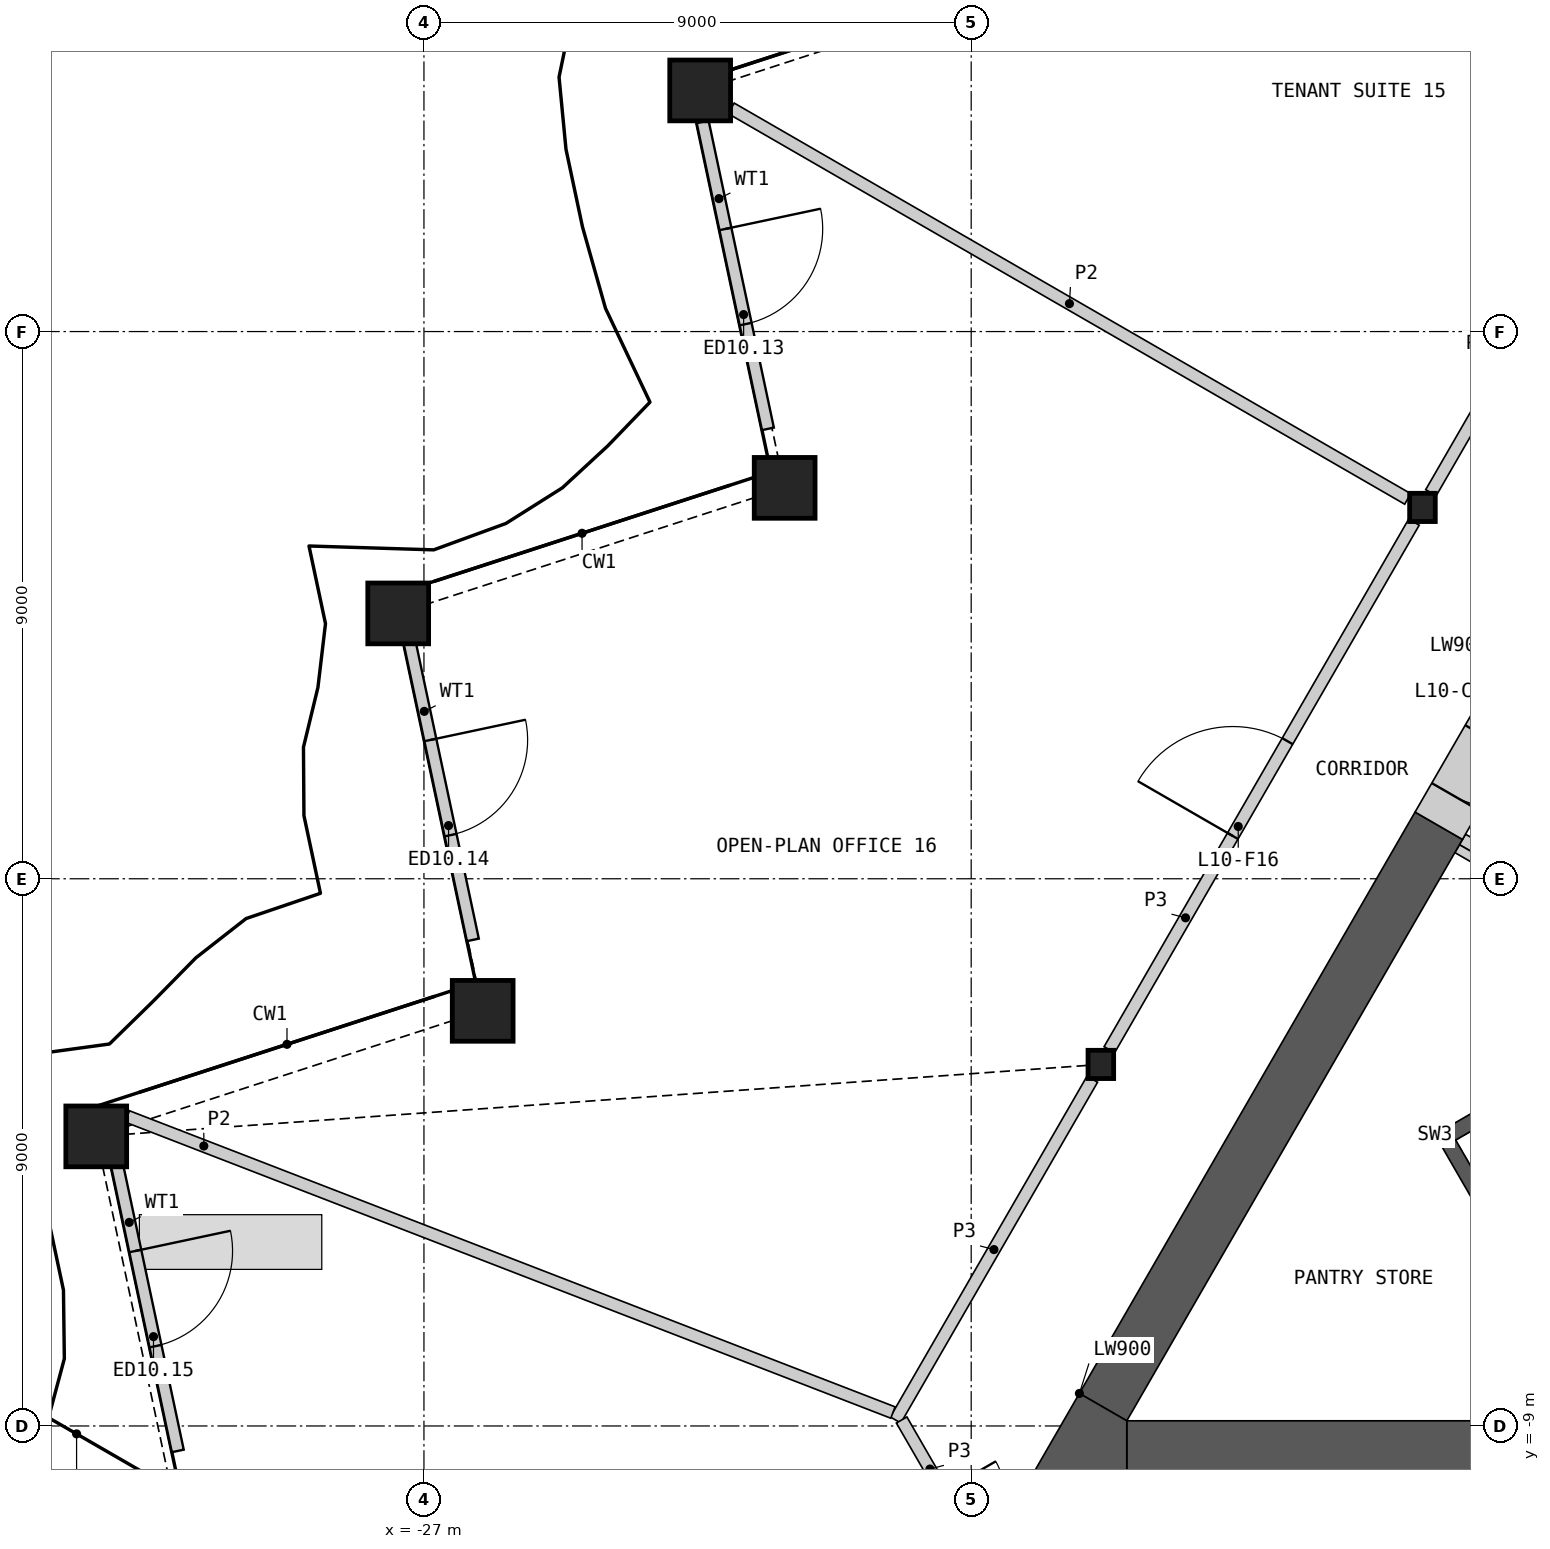
"""IFC4 building model, lengths in metres.
Left out: names, types, materials, properties, quantities, classifications, styles, units other than length and angle.
Written with IfcOpenShell. Run it as: python <this file> out.ifc"""

import sys

from ifc_helpers import new_model, si_unit, direction, frame, frame_2d, origin, origin_2d, place, context, subcontext, project, spatial, polyline, rectangle, hollow_rectangle, i_section, outline, extrude, element, fill, save


model = new_model("IFC4")
c1 = context("Model", 3, precision=1e-05, world=origin(), true_north=direction((0.0, 1.0)))
c2 = subcontext(c1, "Body", "Model", "MODEL_VIEW")
j1 = project(units=[si_unit("LENGTHUNIT", "METRE"), si_unit("PLANEANGLEUNIT", "RADIAN")], contexts=[c1])
p1 = place(None, origin())
s1 = spatial("IfcSite", under=j1, at=p1, CompositionType="ELEMENT")
p2 = place(p1, origin())
s2 = spatial("IfcBuilding", under=s1, at=p2, CompositionType="ELEMENT")
p3 = place(p2, frame((0.0, 0.0, 51.0)))
s3 = spatial("IfcBuildingStorey", under=s2, at=p3, CompositionType="ELEMENT", Elevation=51.0)
for number, where, z_axis, x_axis in (
    (1, (-22.457, 12.966, 0.0), (0.0, 0.0, 1.0), (1.0, 0.0, 0.0)),
    (2, (-21.068, 6.429, 0.0), (0.0, 0.0, 1.0), (1.0, 0.0, 0.0)),
    (3, (-27.423, 4.364, 0.0), (0.0, 0.0, 1.0), (1.0, 0.0, 0.0)),
    (4, (-26.034, -2.172, 0.0), (0.0, 0.0, 1.0), (1.0, 0.0, 0.0)),
    (5, (-32.389, -4.237, 0.0), (0.0, 0.0, 1.0), (1.0, 0.0, 0.0)),
):
    element("IfcColumn", number, at=place(p3, frame(where, z_axis=z_axis, x_axis=x_axis)), inside=s3, PredefinedType="COLUMN", context=c2, shape_type="SweptSolid", body=[
        extrude(hollow_rectangle(XDim=1.0, YDim=1.0, WallThickness=0.07, at=origin_2d()), origin(), (0.0, 0.0, 1.0), 4.2),
    ])
for number, where, z_axis, x_axis in (
    (6, (-10.578, 6.107, 0.0), (0.0, 0.0, 1.0), (1.0, 0.0, 0.0)),
    (7, (-15.868, -3.054, 0.0), (0.0, 0.0, 1.0), (1.0, 0.0, 0.0)),
):
    element("IfcColumn", number, at=place(p3, frame(where, z_axis=z_axis, x_axis=x_axis)), inside=s3, PredefinedType="COLUMN", context=c2, shape_type="SweptSolid", body=[
        extrude(i_section(OverallWidth=0.421, OverallDepth=0.465, WebThickness=0.045, FlangeThickness=0.072, at=origin_2d()), origin(), (0.0, 0.0, 1.0), 4.2),
    ])
p4 = place(p3, frame((-22.416, 12.449, 0.0), z_axis=(0.0, 0.0, 1.0), x_axis=(0.207907400709, -0.978148512615, 0.0)))
e8 = element("IfcWall", 8, at=p4, inside=s3, PredefinedType="SOLIDWALL", context=c2, shape_type="SweptSolid", body=[
    extrude(rectangle(XDim=5.162, YDim=0.2, at=frame_2d((2.581, 0.0))), origin(), (0.0, 0.0, 1.0), 3.189),
])
p5 = place(p4, frame((1.8, 0.0, 0.0)))
e9 = element("IfcOpeningElement", 9, at=p5, cuts=e8, PredefinedType="OPENING", context=c2, shape_type="SweptSolid", body=[
    extrude(rectangle(XDim=1.6, YDim=2.4, at=frame_2d((0.8, 1.2))), frame((0.0, 0.11, 0.0), z_axis=(0.0, -1.0, 0.0), x_axis=(1.0, 0.0, 0.0)), (0.0, 0.0, 1.0), 0.22),
])
p6 = place(p3, frame((-27.261, 4.006, 0.0), z_axis=(0.0, 0.0, 1.0), x_axis=(0.207885539143, -0.978153159079, 0.0)))
e10 = element("IfcWall", 10, at=p6, inside=s3, PredefinedType="SOLIDWALL", context=c2, shape_type="SweptSolid", body=[
    extrude(rectangle(XDim=5.124, YDim=0.2, at=frame_2d((2.562, 0.0))), origin(), (0.0, 0.0, 1.0), 3.189),
])
p7 = place(p6, frame((1.762, 0.0, 0.0)))
e11 = element("IfcOpeningElement", 11, at=p7, cuts=e10, PredefinedType="OPENING", context=c2, shape_type="SweptSolid", body=[
    extrude(rectangle(XDim=1.6, YDim=2.4, at=frame_2d((0.8, 1.2))), frame((0.0, 0.11, 0.0), z_axis=(0.0, -1.0, 0.0), x_axis=(1.0, 0.0, 0.0)), (0.0, 0.0, 1.0), 0.22),
])
p8 = place(p3, frame((-32.114, -4.399, 0.0), z_axis=(0.0, 0.0, 1.0), x_axis=(0.207931126702, -0.978143469307, 0.0)))
e12 = element("IfcWall", 12, at=p8, inside=s3, PredefinedType="SOLIDWALL", context=c2, shape_type="SweptSolid", body=[
    extrude(rectangle(XDim=5.124, YDim=0.2, at=frame_2d((2.562, 0.0))), origin(), (0.0, 0.0, 1.0), 3.189),
])
p9 = place(p8, frame((1.762, 0.0, 0.0)))
e13 = element("IfcOpeningElement", 13, at=p9, cuts=e12, PredefinedType="OPENING", context=c2, shape_type="SweptSolid", body=[
    extrude(rectangle(XDim=1.6, YDim=2.4, at=frame_2d((0.8, 1.2))), frame((0.0, 0.11, 0.0), z_axis=(0.0, -1.0, 0.0), x_axis=(1.0, 0.0, 0.0)), (0.0, 0.0, 1.0), 0.22),
])
p10 = place(p3, frame((-8.181, -0.357, 0.0), z_axis=(0.0, 0.0, 1.0), x_axis=(-0.866035824272, 0.499981950752, 0.0)))
e14 = element("IfcWall", 14, at=p10, inside=s3, PredefinedType="SHEAR", context=c2, shape_type="SweptSolid", body=[
    extrude(rectangle(XDim=2.009, YDim=0.2, at=frame_2d((1.004, 0.0))), origin(), (0.0, 0.0, 1.0), 3.8),
])
p11 = place(p3, origin())
e15 = element("IfcWall", 15, at=p11, inside=s3, PredefinedType="SHEAR", context=c2, shape_type="SweptSolid", body=[
    extrude(outline(polyline([(-5.307, -1.281), (-10.374, -4.206), (-10.032, -4.298), (-5.182, -1.498), (-5.307, -1.281)])), origin(), (0.0, 0.0, 1.0), 3.8),
])
p12 = place(p3, origin())
e16 = element("IfcWall", 16, at=p12, inside=s3, PredefinedType="SHEAR", context=c2, shape_type="SweptSolid", body=[
    extrude(outline(polyline([(-10.374, -4.206), (-8.83, -6.881), (-8.738, -6.539), (-10.032, -4.298), (-10.374, -4.206)])), origin(), (0.0, 0.0, 1.0), 3.8),
])
p13 = place(p3, frame((-8.268, -0.509, 0.0), z_axis=(0.0, 0.0, 1.0), x_axis=(-0.866035824272, 0.499981950752, 0.0)))
e17 = element("IfcWall", 17, at=p13, inside=s3, PredefinedType="PARTITIONING", context=c2, shape_type="SweptSolid", body=[
    extrude(rectangle(XDim=2.009, YDim=0.15, at=frame_2d((1.004, 0.0))), origin(), (0.0, 0.0, 1.0), 3.8),
])
p14 = place(p3, frame((-15.441, -9.365, 0.0), z_axis=(0.0, 0.0, 1.0), x_axis=(1.0, 0.0, 0.0)))
e18 = element("IfcWall", 18, at=p14, inside=s3, PredefinedType="SHEAR", context=c2, shape_type="SweptSolid", body=[
    extrude(rectangle(XDim=8.871, YDim=0.9, at=frame_2d((4.435, 0.0))), origin(), (0.0, 0.0, 1.0), 3.8),
])
p15 = place(p3, frame((-10.31, 0.872, 0.0), z_axis=(0.0, 0.0, 1.0), x_axis=(-0.499991697393, -0.866030197244, 0.0)))
e19 = element("IfcWall", 19, at=p15, inside=s3, PredefinedType="SHEAR", context=c2, shape_type="SweptSolid", body=[
    extrude(rectangle(XDim=11.041, YDim=0.9, at=frame_2d((5.521, 0.0))), origin(), (0.0, 0.0, 1.0), 3.8),
])
p16 = place(p3, origin())
e20 = element("IfcWall", 20, at=p16, inside=s3, PredefinedType="SHEAR", context=c2, shape_type="SweptSolid", body=[
    extrude(outline(polyline([(-16.221, -8.465), (-15.441, -8.915), (-15.441, -9.815), (-17.0, -9.815), (-16.221, -8.465)])), origin(), (0.0, 0.0, 1.0), 3.8),
])
p17 = place(p3, frame((-9.21, 2.777, 0.0), z_axis=(0.0, 0.0, 1.0), x_axis=(-0.500077893725, -0.86598042715, 0.0)))
e21 = element("IfcWall", 21, at=p17, inside=s3, PredefinedType="SHEAR", context=c2, shape_type="SweptSolid", body=[
    extrude(rectangle(XDim=2.2, YDim=0.9, at=frame_2d((1.1, 0.0))), origin(), (0.0, 0.0, 1.0), 3.8),
])
p18 = place(p17, frame((0.55, 0.0, 0.0)))
e22 = element("IfcOpeningElement", 22, at=p18, cuts=e21, PredefinedType="OPENING", context=c2, shape_type="SweptSolid", body=[
    extrude(rectangle(XDim=1.1, YDim=2.1, at=frame_2d((0.55, 1.05))), frame((0.0, 0.46, 0.0), z_axis=(0.0, -1.0, 0.0), x_axis=(1.0, 0.0, 0.0)), (0.0, 0.0, 1.0), 0.92),
])
p19 = place(p3, frame((-10.439, 6.35, 0.0), z_axis=(0.0, 0.0, 1.0), x_axis=(0.50001002959, 0.86601961312, 0.0)))
e23 = element("IfcWall", 23, at=p19, inside=s3, PredefinedType="PARTITIONING", context=c2, shape_type="SweptSolid", body=[
    extrude(rectangle(XDim=10.019, YDim=0.2, at=frame_2d((5.009, 0.0))), origin(), (0.0, 0.0, 1.0), 3.8),
])
p20 = place(p19, frame((4.159, 0.0, 0.0)))
e24 = element("IfcOpeningElement", 24, at=p20, cuts=e23, PredefinedType="OPENING", context=c2, shape_type="SweptSolid", body=[
    extrude(rectangle(XDim=1.0, YDim=2.1, at=frame_2d((0.5, 1.05))), frame((0.0, 0.11, 0.0), z_axis=(0.0, -1.0, 0.0), x_axis=(1.0, 0.0, 0.0)), (0.0, 0.0, 1.0), 0.22),
])
p21 = place(p3, frame((-15.728, -2.811, 0.0), z_axis=(0.0, 0.0, 1.0), x_axis=(0.49999175339, 0.866030164915, 0.0)))
e25 = element("IfcWall", 25, at=p21, inside=s3, PredefinedType="PARTITIONING", context=c2, shape_type="SweptSolid", body=[
    extrude(rectangle(XDim=10.019, YDim=0.2, at=frame_2d((5.009, 0.0))), origin(), (0.0, 0.0, 1.0), 3.8),
])
p22 = place(p21, frame((4.059, 0.0, 0.0)))
e26 = element("IfcOpeningElement", 26, at=p22, cuts=e25, PredefinedType="OPENING", context=c2, shape_type="SweptSolid", body=[
    extrude(rectangle(XDim=1.8, YDim=2.1, at=frame_2d((0.9, 1.05))), frame((0.0, 0.11, 0.0), z_axis=(0.0, -1.0, 0.0), x_axis=(1.0, 0.0, 0.0)), (0.0, 0.0, 1.0), 0.22),
])
p23 = place(p3, frame((-19.244, -8.902, 0.0), z_axis=(0.0, 0.0, 1.0), x_axis=(0.499984737558, 0.86603421538, 0.0)))
e27 = element("IfcWall", 27, at=p23, inside=s3, PredefinedType="PARTITIONING", context=c2, shape_type="SweptSolid", body=[
    extrude(rectangle(XDim=6.473, YDim=0.2, at=frame_2d((3.236, 0.0))), origin(), (0.0, 0.0, 1.0), 3.8),
])
p24 = place(p3, frame((-19.144, -8.902, 0.0), z_axis=(0.0, 0.0, 1.0), x_axis=(0.499958791762, -0.866049194065, 0.0)))
e28 = element("IfcWall", 28, at=p24, inside=s3, PredefinedType="PARTITIONING", context=c2, shape_type="SweptSolid", body=[
    extrude(rectangle(XDim=3.726, YDim=0.2, at=frame_2d((1.863, 0.0))), origin(), (0.0, 0.0, 1.0), 3.8),
])
p25 = place(p24, frame((1.363, 0.0, 0.0)))
e29 = element("IfcOpeningElement", 29, at=p25, cuts=e28, PredefinedType="OPENING", context=c2, shape_type="SweptSolid", body=[
    extrude(rectangle(XDim=1.0, YDim=2.1, at=frame_2d((0.5, 1.05))), frame((0.0, 0.11, 0.0), z_axis=(0.0, -1.0, 0.0), x_axis=(1.0, 0.0, 0.0)), (0.0, 0.0, 1.0), 0.22),
])
p26 = place(p3, frame((-31.879, -3.908, 0.0), z_axis=(0.0, 0.0, 1.0), x_axis=(0.932669586354, -0.360731815467, 0.0)))
e30 = element("IfcWall", 30, at=p26, inside=s3, PredefinedType="PARTITIONING", context=c2, shape_type="SweptSolid", body=[
    extrude(rectangle(XDim=13.501, YDim=0.2, at=frame_2d((6.75, 0.0))), origin(), (0.0, 0.0, 1.0), 2.885),
])
p27 = place(p3, frame((-21.947, 12.671, 0.0), z_axis=(0.0, 0.0, 1.0), x_axis=(0.866026729935, -0.499997703033, 0.0)))
e31 = element("IfcWall", 31, at=p27, inside=s3, PredefinedType="PARTITIONING", context=c2, shape_type="SweptSolid", body=[
    extrude(rectangle(XDim=12.848, YDim=0.2, at=frame_2d((6.424, 0.0))), origin(), (0.0, 0.0, 1.0), 2.885),
])
p28 = place(p5, origin())
e32 = element("IfcDoor", 32, at=p28, inside=s3, OperationType="DOUBLE_DOOR_SINGLE_SWING", PredefinedType="DOOR", context=c2, shape_type="SweptSolid", body=[
    extrude(rectangle(XDim=1.6, YDim=2.4, at=frame_2d((0.8, 1.2))), frame((0.0, 0.025, 0.0), z_axis=(0.0, -1.0, 0.0), x_axis=(1.0, 0.0, 0.0)), (0.0, 0.0, 1.0), 0.05),
])
fill(e9, e32)
p29 = place(p7, origin())
e33 = element("IfcDoor", 33, at=p29, inside=s3, OperationType="DOUBLE_DOOR_SINGLE_SWING", PredefinedType="DOOR", context=c2, shape_type="SweptSolid", body=[
    extrude(rectangle(XDim=1.6, YDim=2.4, at=frame_2d((0.8, 1.2))), frame((0.0, 0.025, 0.0), z_axis=(0.0, -1.0, 0.0), x_axis=(1.0, 0.0, 0.0)), (0.0, 0.0, 1.0), 0.05),
])
fill(e11, e33)
p30 = place(p9, origin())
e34 = element("IfcDoor", 34, at=p30, inside=s3, OperationType="DOUBLE_DOOR_SINGLE_SWING", PredefinedType="DOOR", context=c2, shape_type="SweptSolid", body=[
    extrude(rectangle(XDim=1.6, YDim=2.4, at=frame_2d((0.8, 1.2))), frame((0.0, 0.025, 0.0), z_axis=(0.0, -1.0, 0.0), x_axis=(1.0, 0.0, 0.0)), (0.0, 0.0, 1.0), 0.05),
])
fill(e13, e34)
p31 = place(p18, origin())
e35 = element("IfcDoor", 35, at=p31, inside=s3, OperationType="SINGLE_SWING_LEFT", PredefinedType="DOOR", context=c2, shape_type="SweptSolid", body=[
    extrude(rectangle(XDim=1.1, YDim=2.1, at=frame_2d((0.55, 1.05))), frame((0.0, 0.205, 0.0), z_axis=(0.0, -1.0, 0.0), x_axis=(1.0, 0.0, 0.0)), (0.0, 0.0, 1.0), 0.05),
])
fill(e22, e35)
p32 = place(p22, origin())
e36 = element("IfcDoor", 36, at=p32, inside=s3, OperationType="DOUBLE_DOOR_SINGLE_SWING", PredefinedType="DOOR", context=c2, shape_type="SweptSolid", body=[
    extrude(rectangle(XDim=1.8, YDim=2.1, at=frame_2d((0.9, 1.05))), frame((0.0, 0.025, 0.0), z_axis=(0.0, -1.0, 0.0), x_axis=(1.0, 0.0, 0.0)), (0.0, 0.0, 1.0), 0.05),
])
fill(e26, e36)
save(model, sys.argv[1])
